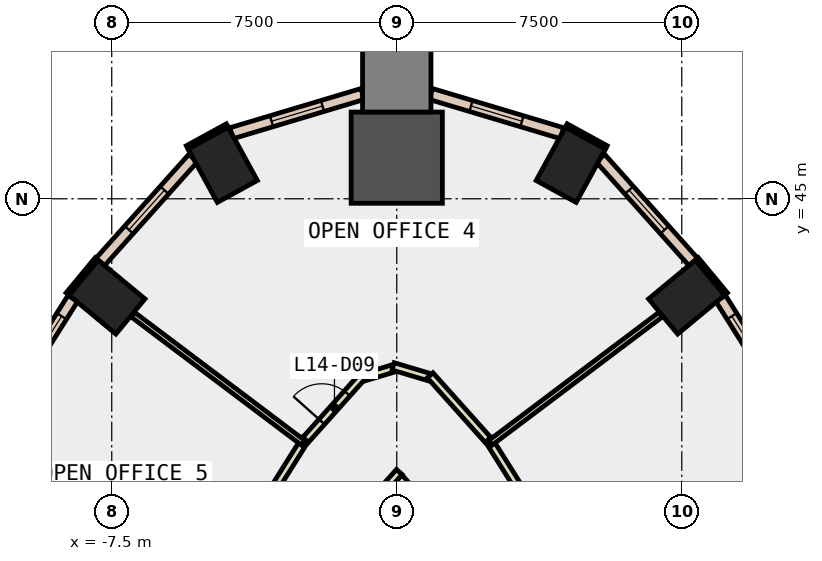
"""IFC4 building model, lengths in metres.
Left out: names, types, materials, properties, quantities, classifications, styles, units other than length and angle.
Written with IfcOpenShell. Run it as: python <this file> out.ifc"""

import sys

from ifc_helpers import new_model, si_unit, direction, frame, frame_2d, origin, origin_2d, place, context, subcontext, project, spatial, rectangle, extrude, element, fill, save


model = new_model("IFC4")
c1 = context("Model", 3, precision=1e-05, world=origin(), true_north=direction((0.0, 1.0)))
c2 = subcontext(c1, "Body", "Model", "MODEL_VIEW")
j1 = project(units=[si_unit("LENGTHUNIT", "METRE"), si_unit("PLANEANGLEUNIT", "RADIAN")], contexts=[c1])
p1 = place(None, origin())
s1 = spatial("IfcSite", under=j1, at=p1, CompositionType="ELEMENT")
p2 = place(p1, origin())
s2 = spatial("IfcBuilding", under=s1, at=p2, CompositionType="ELEMENT")
p3 = place(p2, frame((0.0, 0.0, 68.6)))
s3 = spatial("IfcBuildingStorey", under=s2, at=p3, CompositionType="ELEMENT", Elevation=68.6)
for number, where, z_axis, x_axis in (
    (1, (7.625, 42.414, -0.4), (0.0, 0.0, 1.0), (-0.638, 0.77, 0.0)),
    (2, (4.579, 45.895, -0.4), (0.0, 0.0, 1.0), (-0.877, 0.48, 0.0)),
):
    element("IfcColumn", number, at=place(p3, frame(where, z_axis=z_axis, x_axis=x_axis)), inside=s3, PredefinedType="COLUMN", context=c2, shape_type="SweptSolid", body=[
        extrude(rectangle(XDim=1.2, YDim=1.6, at=origin_2d()), origin(), (0.0, 0.0, 1.0), 4.2),
    ])
p4 = place(p3, frame((0.0, 46.082, -0.4), z_axis=(0.0, 0.0, 1.0), x_axis=(0.0, 1.0, 0.0)))
e3 = element("IfcColumn", 3, at=p4, inside=s3, PredefinedType="COLUMN", context=c2, shape_type="SweptSolid", body=[
    extrude(rectangle(XDim=2.4, YDim=2.4, at=origin_2d()), origin(), (0.0, 0.0, 1.0), 4.2),
])
for number, where, z_axis, x_axis in (
    (4, (-4.579, 45.895, -0.4), (0.0, 0.0, 1.0), (0.877, 0.48, 0.0)),
    (5, (-7.625, 42.414, -0.4), (0.0, 0.0, 1.0), (0.638, 0.77, 0.0)),
):
    element("IfcColumn", number, at=place(p3, frame(where, z_axis=z_axis, x_axis=x_axis)), inside=s3, PredefinedType="COLUMN", context=c2, shape_type="SweptSolid", body=[
        extrude(rectangle(XDim=1.2, YDim=1.6, at=origin_2d()), origin(), (0.0, 0.0, 1.0), 4.2),
    ])
p5 = place(p3, frame((0.0, 48.182, -0.4), z_axis=(0.0, 0.0, 1.0), x_axis=(0.0, 1.0, 0.0)))
e6 = element("IfcColumn", 6, at=p5, inside=s3, PredefinedType="COLUMN", context=c2, shape_type="SweptSolid", body=[
    extrude(rectangle(XDim=1.8, YDim=1.8, at=origin_2d()), origin(), (0.0, 0.0, 1.0), 4.2),
])
for number, where, z_axis, x_axis in (
    (7, (5.513, 46.352, 0.0), (0.0, 0.0, 1.0), (-0.877, 0.48, 0.0)),
    (8, (-4.461, 46.928, 0.0), (0.0, 0.0, 1.0), (-0.877, -0.48, 0.0)),
):
    element("IfcWall", number, at=place(p3, frame(where, z_axis=z_axis, x_axis=x_axis)), inside=s3, PredefinedType="STANDARD", context=c2, shape_type="SweptSolid", body=[
        extrude(rectangle(XDim=1.199, YDim=0.1, at=frame_2d((0.6, 0.0))), origin(), (0.0, 0.0, 1.0), 3.8),
    ])
for number, where, z_axis, x_axis in (
    (9, (8.662, 42.494, 0.0), (0.0, 0.0, 1.0), (-0.638, 0.77, 0.0)),
    (10, (-7.897, 43.418, 0.0), (0.0, 0.0, 1.0), (-0.638, -0.77, 0.0)),
):
    element("IfcWall", number, at=place(p3, frame(where, z_axis=z_axis, x_axis=x_axis)), inside=s3, PredefinedType="STANDARD", context=c2, shape_type="SweptSolid", body=[
        extrude(rectangle(XDim=1.2, YDim=0.1, at=frame_2d((0.6, 0.0))), origin(), (0.0, 0.0, 1.0), 3.8),
    ])
p6 = place(p3, frame((11.833, 37.116, 0.0), z_axis=(0.0, 0.0, 1.0), x_axis=(-0.532322705893, 0.846541515102, 0.0)))
e11 = element("IfcWall", 11, at=p6, inside=s3, PredefinedType="STANDARD", context=c2, shape_type="SweptSolid", body=[
    extrude(rectangle(XDim=6.218, YDim=0.3, at=frame_2d((3.109, 0.0))), origin(), (0.0, 0.0, 1.0), 3.8),
])
p7 = place(p6, frame((0.555, 0.0, 0.9)))
e12 = element("IfcOpeningElement", 12, at=p7, cuts=e11, PredefinedType="OPENING", context=c2, shape_type="SweptSolid", body=[
    extrude(rectangle(XDim=2.0, YDim=2.6, at=frame_2d((1.0, 1.3))), frame((0.0, 0.16, 0.0), z_axis=(0.0, -1.0, 0.0), x_axis=(1.0, 0.0, 0.0)), (0.0, 0.0, 1.0), 0.32),
])
p8 = place(p6, frame((3.664, 0.0, 0.9)))
e13 = element("IfcOpeningElement", 13, at=p8, cuts=e11, PredefinedType="OPENING", context=c2, shape_type="SweptSolid", body=[
    extrude(rectangle(XDim=2.0, YDim=2.6, at=frame_2d((1.0, 1.3))), frame((0.0, 0.16, 0.0), z_axis=(0.0, -1.0, 0.0), x_axis=(1.0, 0.0, 0.0)), (0.0, 0.0, 1.0), 0.32),
])
p9 = place(p3, frame((7.803, 43.339, 0.0), z_axis=(0.0, 0.0, 1.0), x_axis=(-0.666901909312, 0.745145518242, 0.0)))
e14 = element("IfcWall", 14, at=p9, inside=s3, PredefinedType="STANDARD", context=c2, shape_type="SweptSolid", body=[
    extrude(rectangle(XDim=3.666, YDim=0.3, at=frame_2d((1.833, 0.0))), origin(), (0.0, 0.0, 1.0), 3.8),
])
p10 = place(p9, frame((1.133, 0.0, 0.9)))
e15 = element("IfcOpeningElement", 15, at=p10, cuts=e14, PredefinedType="OPENING", context=c2, shape_type="SweptSolid", body=[
    extrude(rectangle(XDim=1.4, YDim=2.6, at=frame_2d((0.7, 1.3))), frame((0.0, 0.16, 0.0), z_axis=(0.0, -1.0, 0.0), x_axis=(1.0, 0.0, 0.0)), (0.0, 0.0, 1.0), 0.32),
])
p11 = place(p3, frame((4.35, 46.725, 0.0), z_axis=(0.0, 0.0, 1.0), x_axis=(-0.958083325779, 0.286489687186, 0.0)))
e16 = element("IfcWall", 16, at=p11, inside=s3, PredefinedType="STANDARD", context=c2, shape_type="SweptSolid", body=[
    extrude(rectangle(XDim=3.602, YDim=0.3, at=frame_2d((1.801, 0.0))), origin(), (0.0, 0.0, 1.0), 3.8),
])
p12 = place(p11, frame((1.101, 0.0, 0.9)))
e17 = element("IfcOpeningElement", 17, at=p12, cuts=e16, PredefinedType="OPENING", context=c2, shape_type="SweptSolid", body=[
    extrude(rectangle(XDim=1.4, YDim=2.6, at=frame_2d((0.7, 1.3))), frame((0.0, 0.16, 0.0), z_axis=(0.0, -1.0, 0.0), x_axis=(1.0, 0.0, 0.0)), (0.0, 0.0, 1.0), 0.32),
])
p13 = place(p3, frame((-0.899, 47.757, 0.0), z_axis=(0.0, 0.0, 1.0), x_axis=(-0.958083325779, -0.286489687186, 0.0)))
e18 = element("IfcWall", 18, at=p13, inside=s3, PredefinedType="STANDARD", context=c2, shape_type="SweptSolid", body=[
    extrude(rectangle(XDim=3.602, YDim=0.3, at=frame_2d((1.801, 0.0))), origin(), (0.0, 0.0, 1.0), 3.8),
])
p14 = place(p13, frame((1.101, 0.0, 0.9)))
e19 = element("IfcOpeningElement", 19, at=p14, cuts=e18, PredefinedType="OPENING", context=c2, shape_type="SweptSolid", body=[
    extrude(rectangle(XDim=1.4, YDim=2.6, at=frame_2d((0.7, 1.3))), frame((0.0, 0.16, 0.0), z_axis=(0.0, -1.0, 0.0), x_axis=(1.0, 0.0, 0.0)), (0.0, 0.0, 1.0), 0.32),
])
p15 = place(p3, frame((-5.358, 46.071, 0.0), z_axis=(0.0, 0.0, 1.0), x_axis=(-0.666901909312, -0.745145518242, 0.0)))
e20 = element("IfcWall", 20, at=p15, inside=s3, PredefinedType="STANDARD", context=c2, shape_type="SweptSolid", body=[
    extrude(rectangle(XDim=3.666, YDim=0.3, at=frame_2d((1.833, 0.0))), origin(), (0.0, 0.0, 1.0), 3.8),
])
p16 = place(p15, frame((1.133, 0.0, 0.9)))
e21 = element("IfcOpeningElement", 21, at=p16, cuts=e20, PredefinedType="OPENING", context=c2, shape_type="SweptSolid", body=[
    extrude(rectangle(XDim=1.4, YDim=2.6, at=frame_2d((0.7, 1.3))), frame((0.0, 0.16, 0.0), z_axis=(0.0, -1.0, 0.0), x_axis=(1.0, 0.0, 0.0)), (0.0, 0.0, 1.0), 0.32),
])
p17 = place(p3, frame((-8.523, 42.38, 0.0), z_axis=(0.0, 0.0, 1.0), x_axis=(-0.532322705893, -0.846541515102, 0.0)))
e22 = element("IfcWall", 22, at=p17, inside=s3, PredefinedType="STANDARD", context=c2, shape_type="SweptSolid", body=[
    extrude(rectangle(XDim=6.218, YDim=0.3, at=frame_2d((3.109, 0.0))), origin(), (0.0, 0.0, 1.0), 3.8),
])
p18 = place(p17, frame((0.555, 0.0, 0.9)))
e23 = element("IfcOpeningElement", 23, at=p18, cuts=e22, PredefinedType="OPENING", context=c2, shape_type="SweptSolid", body=[
    extrude(rectangle(XDim=2.0, YDim=2.6, at=frame_2d((1.0, 1.3))), frame((0.0, 0.16, 0.0), z_axis=(0.0, -1.0, 0.0), x_axis=(1.0, 0.0, 0.0)), (0.0, 0.0, 1.0), 0.32),
])
p19 = place(p17, frame((3.664, 0.0, 0.9)))
e24 = element("IfcOpeningElement", 24, at=p19, cuts=e22, PredefinedType="OPENING", context=c2, shape_type="SweptSolid", body=[
    extrude(rectangle(XDim=2.0, YDim=2.6, at=frame_2d((1.0, 1.3))), frame((0.0, 0.16, 0.0), z_axis=(0.0, -1.0, 0.0), x_axis=(1.0, 0.0, 0.0)), (0.0, 0.0, 1.0), 0.32),
])
p20 = place(p3, frame((0.476, 37.206, 0.0), z_axis=(0.0, 0.0, 1.0), x_axis=(-0.667027496744, 0.745033098988, 0.0)))
e25 = element("IfcWall", 25, at=p20, inside=s3, PredefinedType="PARTITIONING", context=c2, shape_type="SweptSolid", body=[
    extrude(rectangle(XDim=0.614, YDim=0.2, at=frame_2d((0.307, 0.0))), origin(), (0.0, 0.0, 1.0), 3.8),
])
p21 = place(p3, frame((0.067, 37.812, 0.0), z_axis=(0.0, 0.0, 1.0), x_axis=(-0.667338487106, -0.744754552606, 0.0)))
e26 = element("IfcWall", 26, at=p21, inside=s3, PredefinedType="PARTITIONING", context=c2, shape_type="SweptSolid", body=[
    extrude(rectangle(XDim=0.814, YDim=0.2, at=frame_2d((0.407, 0.0))), origin(), (0.0, 0.0, 1.0), 3.8),
])
p22 = place(p3, frame((2.413, 38.665, 0.0), z_axis=(0.0, 0.0, 1.0), x_axis=(0.532328273879, -0.846538013812, 0.0)))
e27 = element("IfcWall", 27, at=p22, inside=s3, PredefinedType="PARTITIONING", context=c2, shape_type="SweptSolid", body=[
    extrude(rectangle(XDim=6.89, YDim=0.2, at=frame_2d((3.445, 0.0))), origin(), (0.0, 0.0, 1.0), 3.8),
])
p23 = place(p22, frame((2.945, 0.0, 0.0)))
e28 = element("IfcOpeningElement", 28, at=p23, cuts=e27, PredefinedType="OPENING", context=c2, shape_type="SweptSolid", body=[
    extrude(rectangle(XDim=1.0, YDim=2.1, at=frame_2d((0.5, 1.05))), frame((0.0, 0.11, 0.0), z_axis=(0.0, -1.0, 0.0), x_axis=(1.0, 0.0, 0.0)), (0.0, 0.0, 1.0), 0.22),
])
p24 = place(p3, frame((-2.4, 38.655, 0.0), z_axis=(0.0, 0.0, 1.0), x_axis=(0.666791730919, 0.745244112743, 0.0)))
e29 = element("IfcWall", 29, at=p24, inside=s3, PredefinedType="PARTITIONING", context=c2, shape_type="SweptSolid", body=[
    extrude(rectangle(XDim=2.281, YDim=0.2, at=frame_2d((1.141, 0.0))), origin(), (0.0, 0.0, 1.0), 3.8),
])
p25 = place(p24, frame((0.641, 0.0, 0.0)))
e30 = element("IfcOpeningElement", 30, at=p25, cuts=e29, PredefinedType="OPENING", context=c2, shape_type="SweptSolid", body=[
    extrude(rectangle(XDim=1.0, YDim=2.1, at=frame_2d((0.5, 1.05))), frame((0.0, 0.11, 0.0), z_axis=(0.0, -1.0, 0.0), x_axis=(1.0, 0.0, 0.0)), (0.0, 0.0, 1.0), 0.22),
])
p26 = place(p3, frame((-0.849, 40.309, 0.0), z_axis=(0.0, 0.0, 1.0), x_axis=(0.958210118601, 0.286065322279, 0.0)))
e31 = element("IfcWall", 31, at=p26, inside=s3, PredefinedType="PARTITIONING", context=c2, shape_type="SweptSolid", body=[
    extrude(rectangle(XDim=0.786, YDim=0.2, at=frame_2d((0.393, 0.0))), origin(), (0.0, 0.0, 1.0), 3.8),
])
p27 = place(p3, frame((-0.096, 40.591, 0.0), z_axis=(0.0, 0.0, 1.0), x_axis=(0.958254449469, -0.285916788721, 0.0)))
e32 = element("IfcWall", 32, at=p27, inside=s3, PredefinedType="PARTITIONING", context=c2, shape_type="SweptSolid", body=[
    extrude(rectangle(XDim=0.986, YDim=0.2, at=frame_2d((0.493, 0.0))), origin(), (0.0, 0.0, 1.0), 3.8),
])
p28 = place(p3, frame((0.879, 40.355, 0.0), z_axis=(0.0, 0.0, 1.0), x_axis=(0.666791730919, -0.745244112743, 0.0)))
e33 = element("IfcWall", 33, at=p28, inside=s3, PredefinedType="PARTITIONING", context=c2, shape_type="SweptSolid", body=[
    extrude(rectangle(XDim=2.281, YDim=0.2, at=frame_2d((1.141, 0.0))), origin(), (0.0, 0.0, 1.0), 3.8),
])
p29 = place(p3, frame((-6.121, 32.768, 0.0), z_axis=(0.0, 0.0, 1.0), x_axis=(0.532309351336, 0.846549912574, 0.0)))
e34 = element("IfcWall", 34, at=p29, inside=s3, PredefinedType="PARTITIONING", context=c2, shape_type="SweptSolid", body=[
    extrude(rectangle(XDim=6.966, YDim=0.2, at=frame_2d((3.483, 0.0))), origin(), (0.0, 0.0, 1.0), 3.8),
])
p30 = place(p29, frame((2.983, 0.0, 0.0)))
e35 = element("IfcOpeningElement", 35, at=p30, cuts=e34, PredefinedType="OPENING", context=c2, shape_type="SweptSolid", body=[
    extrude(rectangle(XDim=1.0, YDim=2.1, at=frame_2d((0.5, 1.05))), frame((0.0, 0.11, 0.0), z_axis=(0.0, -1.0, 0.0), x_axis=(1.0, 0.0, 0.0)), (0.0, 0.0, 1.0), 0.22),
])
for number, where, z_axis, x_axis in (
    (36, (2.466, 38.58, 0.0), (0.0, 0.0, 1.0), (0.799, 0.602, 0.0)),
    (37, (-2.466, 38.58, 0.0), (0.0, 0.0, 1.0), (-0.799, 0.602, 0.0)),
):
    element("IfcWall", number, at=place(p3, frame(where, z_axis=z_axis, x_axis=x_axis)), inside=s3, PredefinedType="PARTITIONING", context=c2, shape_type="SweptSolid", body=[
        extrude(rectangle(XDim=5.605, YDim=0.15, at=frame_2d((2.802, 0.0))), origin(), (0.0, 0.0, 1.0), 3.8),
    ])
p31 = place(p8, origin())
e38 = element("IfcWindow", 38, at=p31, inside=s3, PartitioningType="SINGLE_PANEL", PredefinedType="WINDOW", context=c2, shape_type="SweptSolid", body=[
    extrude(rectangle(XDim=2.0, YDim=2.6, at=frame_2d((1.0, 1.3))), frame((0.0, 0.03, 0.0), z_axis=(0.0, -1.0, 0.0), x_axis=(1.0, 0.0, 0.0)), (0.0, 0.0, 1.0), 0.06),
])
fill(e13, e38)
p32 = place(p10, origin())
e39 = element("IfcWindow", 39, at=p32, inside=s3, PartitioningType="SINGLE_PANEL", PredefinedType="WINDOW", context=c2, shape_type="SweptSolid", body=[
    extrude(rectangle(XDim=1.4, YDim=2.6, at=frame_2d((0.7, 1.3))), frame((0.0, 0.03, 0.0), z_axis=(0.0, -1.0, 0.0), x_axis=(1.0, 0.0, 0.0)), (0.0, 0.0, 1.0), 0.06),
])
fill(e15, e39)
p33 = place(p12, origin())
e40 = element("IfcWindow", 40, at=p33, inside=s3, PartitioningType="SINGLE_PANEL", PredefinedType="WINDOW", context=c2, shape_type="SweptSolid", body=[
    extrude(rectangle(XDim=1.4, YDim=2.6, at=frame_2d((0.7, 1.3))), frame((0.0, 0.03, 0.0), z_axis=(0.0, -1.0, 0.0), x_axis=(1.0, 0.0, 0.0)), (0.0, 0.0, 1.0), 0.06),
])
fill(e17, e40)
p34 = place(p14, origin())
e41 = element("IfcWindow", 41, at=p34, inside=s3, PartitioningType="SINGLE_PANEL", PredefinedType="WINDOW", context=c2, shape_type="SweptSolid", body=[
    extrude(rectangle(XDim=1.4, YDim=2.6, at=frame_2d((0.7, 1.3))), frame((0.0, 0.03, 0.0), z_axis=(0.0, -1.0, 0.0), x_axis=(1.0, 0.0, 0.0)), (0.0, 0.0, 1.0), 0.06),
])
fill(e19, e41)
p35 = place(p16, origin())
e42 = element("IfcWindow", 42, at=p35, inside=s3, PartitioningType="SINGLE_PANEL", PredefinedType="WINDOW", context=c2, shape_type="SweptSolid", body=[
    extrude(rectangle(XDim=1.4, YDim=2.6, at=frame_2d((0.7, 1.3))), frame((0.0, 0.03, 0.0), z_axis=(0.0, -1.0, 0.0), x_axis=(1.0, 0.0, 0.0)), (0.0, 0.0, 1.0), 0.06),
])
fill(e21, e42)
p36 = place(p18, origin())
e43 = element("IfcWindow", 43, at=p36, inside=s3, PartitioningType="SINGLE_PANEL", PredefinedType="WINDOW", context=c2, shape_type="SweptSolid", body=[
    extrude(rectangle(XDim=2.0, YDim=2.6, at=frame_2d((1.0, 1.3))), frame((0.0, 0.03, 0.0), z_axis=(0.0, -1.0, 0.0), x_axis=(1.0, 0.0, 0.0)), (0.0, 0.0, 1.0), 0.06),
])
fill(e23, e43)
p37 = place(p25, origin())
e44 = element("IfcDoor", 44, at=p37, inside=s3, OperationType="SINGLE_SWING_LEFT", PredefinedType="DOOR", context=c2, shape_type="SweptSolid", body=[
    extrude(rectangle(XDim=1.0, YDim=2.1, at=frame_2d((0.5, 1.05))), frame((0.0, 0.025, 0.0), z_axis=(0.0, -1.0, 0.0), x_axis=(1.0, 0.0, 0.0)), (0.0, 0.0, 1.0), 0.05),
])
fill(e30, e44)
save(model, sys.argv[1])
